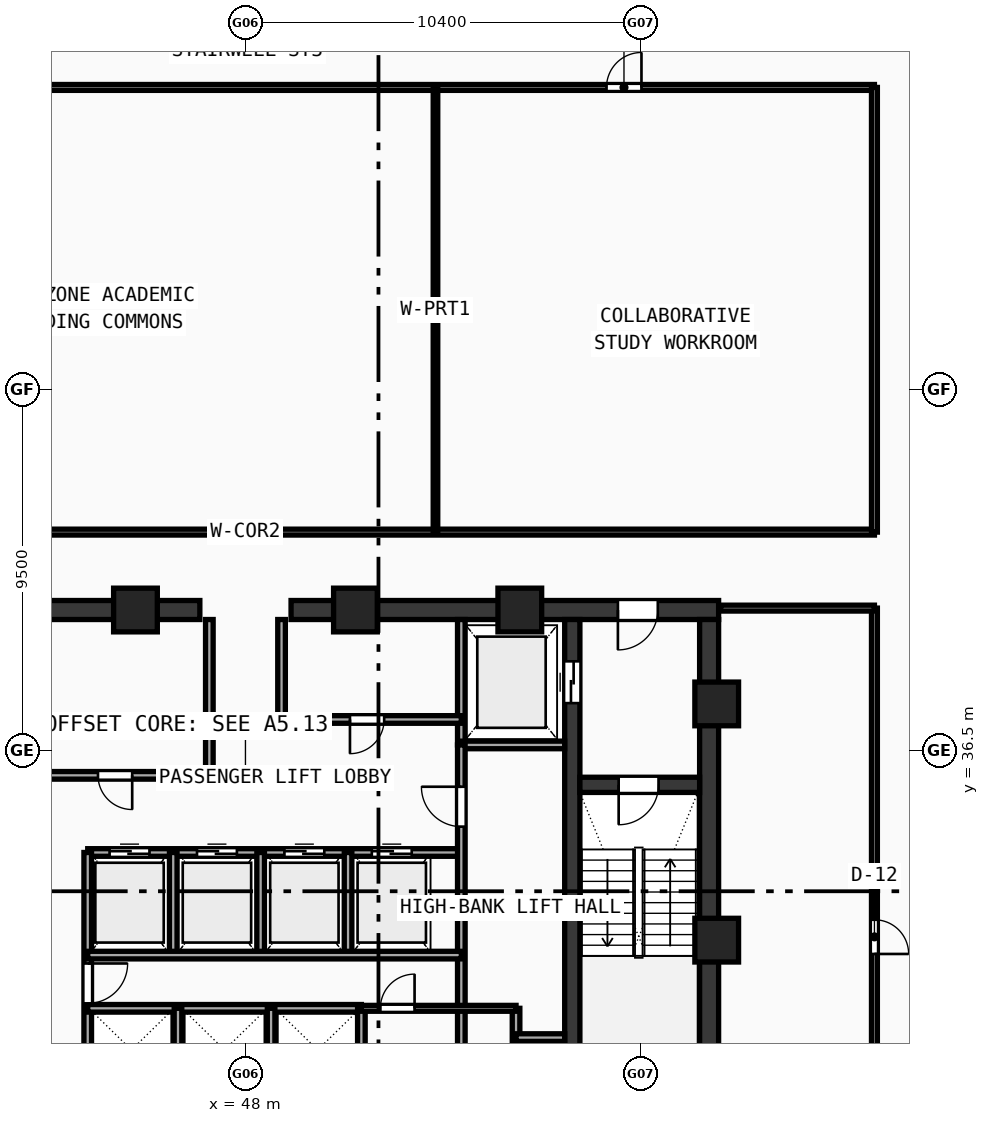
"""IFC4 building model, lengths in metres.
Left out: names, types, materials, properties, quantities, classifications, styles, units other than length and angle.
Written with IfcOpenShell. Run it as: python <this file> out.ifc"""

import sys

from ifc_helpers import new_model, si_unit, direction, frame, frame_2d, origin, origin_with_axes, origin_2d, place, context, subcontext, project, spatial, rectangle, hollow_rectangle, extrude, source, transform, mapped, element, fill, save


model = new_model("IFC4")
c1 = context("Model", 3, precision=1e-05, world=origin(), true_north=direction((0.0, 1.0)))
c2 = subcontext(c1, "Body", "Model", "MODEL_VIEW")
j1 = project(units=[si_unit("LENGTHUNIT", "METRE"), si_unit("PLANEANGLEUNIT", "RADIAN")], contexts=[c1])
p1 = place(None, origin())
s1 = spatial("IfcSite", under=j1, at=p1, CompositionType="ELEMENT")
p2 = place(p1, origin())
s2 = spatial("IfcBuilding", under=s1, at=p2, CompositionType="ELEMENT")
p3 = place(p2, frame((0.0, 0.0, 192.36)))
s3 = spatial("IfcBuildingStorey", under=s2, at=p3, CompositionType="ELEMENT", Elevation=192.36)
p4 = place(p3, frame((35.55, 40.2, 0.0), z_axis=(0.0, 0.0, 1.0), x_axis=(1.0, 0.0, 0.0)))
e1 = element("IfcWall", 1, at=p4, inside=s3, PredefinedType="SHEAR", context=c2, shape_type="SweptSolid", body=[
    extrude(rectangle(XDim=11.25, YDim=0.5, at=frame_2d((5.625, 0.0))), origin(), (0.0, 0.0, 1.0), 3.54),
])
p5 = place(p4, frame((1.6, 0.0, 0.0)))
e2 = element("IfcOpeningElement", 2, at=p5, cuts=e1, PredefinedType="OPENING", context=c2, shape_type="SweptSolid", body=[
    extrude(rectangle(XDim=1.05, YDim=2.1, at=frame_2d((0.525, 1.05))), frame((0.0, 0.26, 0.0), z_axis=(0.0, -1.0, 0.0), x_axis=(1.0, 0.0, 0.0)), (0.0, 0.0, 1.0), 0.52),
])
p6 = place(p3, frame((49.2, 40.2, 0.0), z_axis=(0.0, 0.0, 1.0), x_axis=(1.0, 0.0, 0.0)))
e3 = element("IfcWall", 3, at=p6, inside=s3, PredefinedType="SHEAR", context=c2, shape_type="SweptSolid", body=[
    extrude(rectangle(XDim=11.25, YDim=0.5, at=frame_2d((5.625, 0.0))), origin(), (0.0, 0.0, 1.0), 3.54),
])
p7 = place(p6, frame((8.6, 0.0, 0.0)))
e4 = element("IfcOpeningElement", 4, at=p7, cuts=e3, PredefinedType="OPENING", context=c2, shape_type="SweptSolid", body=[
    extrude(rectangle(XDim=1.05, YDim=2.1, at=frame_2d((0.525, 1.05))), frame((0.0, 0.26, 0.0), z_axis=(0.0, -1.0, 0.0), x_axis=(1.0, 0.0, 0.0)), (0.0, 0.0, 1.0), 0.52),
])
p8 = place(p3, frame((60.2, 27.75, 0.0), z_axis=(0.0, 0.0, 1.0), x_axis=(0.0, 1.0, 0.0)))
e5 = element("IfcWall", 5, at=p8, inside=s3, PredefinedType="SHEAR", context=c2, shape_type="SweptSolid", body=[
    extrude(rectangle(XDim=12.2, YDim=0.5, at=frame_2d((6.1, 0.0))), origin(), (0.0, 0.0, 1.0), 3.54),
])
p9 = place(p3, frame((56.6, 27.75, 0.0), z_axis=(0.0, 0.0, 1.0), x_axis=(0.0, 1.0, 0.0)))
e6 = element("IfcWall", 6, at=p9, inside=s3, PredefinedType="SHEAR", context=c2, shape_type="SweptSolid", body=[
    extrude(rectangle(XDim=12.2, YDim=0.4, at=frame_2d((6.1, 0.0))), origin(), (0.0, 0.0, 1.0), 3.54),
])
p10 = place(p9, frame((10.0, 0.0, 0.0)))
e7 = element("IfcOpeningElement", 7, at=p10, cuts=e6, PredefinedType="OPENING", context=c2, shape_type="SweptSolid", body=[
    extrude(rectangle(XDim=1.1, YDim=2.1, at=frame_2d((0.55, 1.05))), frame((0.0, 0.21, 0.0), z_axis=(0.0, -1.0, 0.0), x_axis=(1.0, 0.0, 0.0)), (0.0, 0.0, 1.0), 0.42),
])
p11 = place(p3, frame((56.8, 35.6, 0.0), z_axis=(0.0, 0.0, 1.0), x_axis=(1.0, 0.0, 0.0)))
e8 = element("IfcWall", 8, at=p11, inside=s3, PredefinedType="SHEAR", context=c2, shape_type="SweptSolid", body=[
    extrude(rectangle(XDim=3.15, YDim=0.4, at=frame_2d((1.575, 0.0))), origin(), (0.0, 0.0, 1.0), 3.54),
])
p12 = place(p11, frame((1.02, 0.0, 0.0)))
e9 = element("IfcOpeningElement", 9, at=p12, cuts=e8, PredefinedType="OPENING", context=c2, shape_type="SweptSolid", body=[
    extrude(rectangle(XDim=1.05, YDim=2.1, at=frame_2d((0.525, 1.05))), frame((0.0, 0.21, 0.0), z_axis=(0.0, -1.0, 0.0), x_axis=(1.0, 0.0, 0.0)), (0.0, 0.0, 1.0), 0.42),
])
m1 = source(origin(), c2, "Body", "SweptSolid", [
    extrude(hollow_rectangle(XDim=1.15, YDim=1.15, WallThickness=0.048, at=origin_2d()), origin(), (0.0, 0.0, 1.0), 3.8),
])
for number, where, z_axis, x_axis in (
    (10, (60.4, 31.513, -0.26), (0.0, 0.0, 1.0), (1.0, 0.0, 0.0)),
    (11, (60.4, 37.729, -0.26), (0.0, 0.0, 1.0), (1.0, 0.0, 0.0)),
    (12, (55.219, 40.2, -0.26), (0.0, 0.0, 1.0), (1.0, 0.0, 0.0)),
    (13, (50.894, 40.2, -0.26), (0.0, 0.0, 1.0), (1.0, 0.0, 0.0)),
    (14, (45.106, 40.2, -0.26), (0.0, 0.0, 1.0), (1.0, 0.0, 0.0)),
):
    element("IfcColumn", number, at=place(p3, frame(where, z_axis=z_axis, x_axis=x_axis)), inside=s3, PredefinedType="COLUMN", context=c2, shape_type="MappedRepresentation", body=[
        mapped(m1, transform((0.0, 0.0, 0.0), scale=1.0)),
    ])
p13 = place(p3, frame((53.68, 36.65, 0.0), z_axis=(0.0, 0.0, 1.0), x_axis=(0.0, 1.0, 0.0)))
e15 = element("IfcWall", 15, at=p13, inside=s3, PredefinedType="SOLIDWALL", context=c2, shape_type="SweptSolid", body=[
    extrude(rectangle(XDim=3.3, YDim=0.2, at=frame_2d((1.65, 0.0))), origin(), (0.0, 0.0, 1.0), 3.54),
])
p14 = place(p3, frame((53.68, 36.65, 0.0), z_axis=(0.0, 0.0, 1.0), x_axis=(1.0, 0.0, 0.0)))
e16 = element("IfcWall", 16, at=p14, inside=s3, PredefinedType="SOLIDWALL", context=c2, shape_type="SweptSolid", body=[
    extrude(rectangle(XDim=2.72, YDim=0.2, at=frame_2d((1.36, 0.0))), origin(), (0.0, 0.0, 1.0), 3.54),
])
p15 = place(p3, frame((42.32, 35.85, 0.0), z_axis=(0.0, 0.0, 1.0), x_axis=(1.0, 0.0, 0.0)))
e17 = element("IfcWall", 17, at=p15, inside=s3, PredefinedType="SOLIDWALL", context=c2, shape_type="SweptSolid", body=[
    extrude(rectangle(XDim=4.73, YDim=0.2, at=frame_2d((2.365, 0.0))), origin(), (0.0, 0.0, 1.0), 3.54),
])
p16 = place(p15, frame((1.8, 0.0, 0.0)))
e18 = element("IfcOpeningElement", 18, at=p16, cuts=e17, PredefinedType="OPENING", context=c2, shape_type="SweptSolid", body=[
    extrude(rectangle(XDim=0.9, YDim=2.1, at=frame_2d((0.45, 1.05))), frame((0.0, 0.11, 0.0), z_axis=(0.0, -1.0, 0.0), x_axis=(1.0, 0.0, 0.0)), (0.0, 0.0, 1.0), 0.22),
])
p17 = place(p3, frame((48.95, 37.32, 0.0), z_axis=(0.0, 0.0, 1.0), x_axis=(1.0, 0.0, 0.0)))
e19 = element("IfcWall", 19, at=p17, inside=s3, PredefinedType="SOLIDWALL", context=c2, shape_type="SweptSolid", body=[
    extrude(rectangle(XDim=4.73, YDim=0.2, at=frame_2d((2.365, 0.0))), origin(), (0.0, 0.0, 1.0), 3.54),
])
p18 = place(p17, frame((1.8, 0.0, 0.0)))
e20 = element("IfcOpeningElement", 20, at=p18, cuts=e19, PredefinedType="OPENING", context=c2, shape_type="SweptSolid", body=[
    extrude(rectangle(XDim=0.9, YDim=2.1, at=frame_2d((0.45, 1.05))), frame((0.0, 0.11, 0.0), z_axis=(0.0, -1.0, 0.0), x_axis=(1.0, 0.0, 0.0)), (0.0, 0.0, 1.0), 0.22),
])
p19 = place(p3, frame((47.05, 35.85, 0.0), z_axis=(0.0, 0.0, 1.0), x_axis=(0.0, 1.0, 0.0)))
e21 = element("IfcWall", 21, at=p19, inside=s3, PredefinedType="SOLIDWALL", context=c2, shape_type="SweptSolid", body=[
    extrude(rectangle(XDim=4.1, YDim=0.2, at=frame_2d((2.05, 0.0))), origin(), (0.0, 0.0, 1.0), 3.54),
])
p20 = place(p3, frame((48.95, 37.32, 0.0), z_axis=(0.0, 0.0, 1.0), x_axis=(0.0, 1.0, 0.0)))
e22 = element("IfcWall", 22, at=p20, inside=s3, PredefinedType="SOLIDWALL", context=c2, shape_type="SweptSolid", body=[
    extrude(rectangle(XDim=2.63, YDim=0.2, at=frame_2d((1.315, 0.0))), origin(), (0.0, 0.0, 1.0), 3.54),
])
p21 = place(p3, frame((43.85, 33.82, 0.0), z_axis=(0.0, 0.0, 1.0), x_axis=(1.0, 0.0, 0.0)))
e23 = element("IfcWall", 23, at=p21, inside=s3, PredefinedType="SOLIDWALL", context=c2, shape_type="SweptSolid", body=[
    extrude(rectangle(XDim=9.83, YDim=0.2, at=frame_2d((4.915, 0.0))), origin(), (0.0, 0.0, 1.0), 3.54),
])
p22 = place(p21, frame((0.575, 0.0, 0.0)))
e24 = element("IfcOpeningElement", 24, at=p22, cuts=e23, PredefinedType="OPENING", context=c2, shape_type="SweptSolid", body=[
    extrude(rectangle(XDim=1.05, YDim=2.1, at=frame_2d((0.525, 1.05))), frame((0.0, 0.11, 0.0), z_axis=(0.0, -1.0, 0.0), x_axis=(1.0, 0.0, 0.0)), (0.0, 0.0, 1.0), 0.22),
])
p23 = place(p21, frame((2.875, 0.0, 0.0)))
e25 = element("IfcOpeningElement", 25, at=p23, cuts=e23, PredefinedType="OPENING", context=c2, shape_type="SweptSolid", body=[
    extrude(rectangle(XDim=1.05, YDim=2.1, at=frame_2d((0.525, 1.05))), frame((0.0, 0.11, 0.0), z_axis=(0.0, -1.0, 0.0), x_axis=(1.0, 0.0, 0.0)), (0.0, 0.0, 1.0), 0.22),
])
p24 = place(p21, frame((5.175, 0.0, 0.0)))
e26 = element("IfcOpeningElement", 26, at=p24, cuts=e23, PredefinedType="OPENING", context=c2, shape_type="SweptSolid", body=[
    extrude(rectangle(XDim=1.05, YDim=2.1, at=frame_2d((0.525, 1.05))), frame((0.0, 0.11, 0.0), z_axis=(0.0, -1.0, 0.0), x_axis=(1.0, 0.0, 0.0)), (0.0, 0.0, 1.0), 0.22),
])
p25 = place(p21, frame((7.475, 0.0, 0.0)))
e27 = element("IfcOpeningElement", 27, at=p25, cuts=e23, PredefinedType="OPENING", context=c2, shape_type="SweptSolid", body=[
    extrude(rectangle(XDim=1.05, YDim=2.1, at=frame_2d((0.525, 1.05))), frame((0.0, 0.11, 0.0), z_axis=(0.0, -1.0, 0.0), x_axis=(1.0, 0.0, 0.0)), (0.0, 0.0, 1.0), 0.22),
])
p26 = place(p3, frame((43.85, 27.6, 0.0), z_axis=(0.0, 0.0, 1.0), x_axis=(0.0, 1.0, 0.0)))
e28 = element("IfcWall", 28, at=p26, inside=s3, PredefinedType="SOLIDWALL", context=c2, shape_type="SweptSolid", body=[
    extrude(rectangle(XDim=6.22, YDim=0.2, at=frame_2d((3.11, 0.0))), origin(), (0.0, 0.0, 1.0), 3.54),
])
p27 = place(p26, frame((2.25, 0.0, 0.0)))
e29 = element("IfcOpeningElement", 29, at=p27, cuts=e28, PredefinedType="OPENING", context=c2, shape_type="SweptSolid", body=[
    extrude(rectangle(XDim=1.05, YDim=2.1, at=frame_2d((0.525, 1.05))), frame((0.0, 0.11, 0.0), z_axis=(0.0, -1.0, 0.0), x_axis=(1.0, 0.0, 0.0)), (0.0, 0.0, 1.0), 0.22),
])
p28 = place(p3, frame((53.68, 27.6, 0.0), z_axis=(0.0, 0.0, 1.0), x_axis=(0.0, 1.0, 0.0)))
e30 = element("IfcWall", 30, at=p28, inside=s3, PredefinedType="SOLIDWALL", context=c2, shape_type="SweptSolid", body=[
    extrude(rectangle(XDim=9.05, YDim=0.2, at=frame_2d((4.525, 0.0))), origin(), (0.0, 0.0, 1.0), 3.54),
])
p29 = place(p28, frame((6.9, 0.0, 0.0)))
e31 = element("IfcOpeningElement", 31, at=p29, cuts=e30, PredefinedType="OPENING", context=c2, shape_type="SweptSolid", body=[
    extrude(rectangle(XDim=1.05, YDim=2.1, at=frame_2d((0.525, 1.05))), frame((0.0, 0.11, 0.0), z_axis=(0.0, -1.0, 0.0), x_axis=(1.0, 0.0, 0.0)), (0.0, 0.0, 1.0), 0.22),
])
for number, where, z_axis, x_axis in (
    (32, (46.1, 31.12, 0.0), (0.0, 0.0, 1.0), (0.0, 1.0, 0.0)),
    (33, (48.4, 31.12, 0.0), (0.0, 0.0, 1.0), (0.0, 1.0, 0.0)),
    (34, (50.7, 31.12, 0.0), (0.0, 0.0, 1.0), (0.0, 1.0, 0.0)),
):
    element("IfcWall", number, at=place(p3, frame(where, z_axis=z_axis, x_axis=x_axis)), inside=s3, PredefinedType="SOLIDWALL", context=c2, shape_type="SweptSolid", body=[
        extrude(rectangle(XDim=2.7, YDim=0.2, at=frame_2d((1.35, 0.0))), origin(), (0.0, 0.0, 1.0), 3.54),
    ])
p30 = place(p3, frame((43.85, 29.72, 0.0), z_axis=(0.0, 0.0, 1.0), x_axis=(1.0, 0.0, 0.0)))
e35 = element("IfcWall", 35, at=p30, inside=s3, PredefinedType="SOLIDWALL", context=c2, shape_type="SweptSolid", body=[
    extrude(rectangle(XDim=7.2, YDim=0.2, at=frame_2d((3.6, 0.0))), origin(), (0.0, 0.0, 1.0), 3.54),
])
p31 = place(p3, frame((51.05, 27.6, 0.0), z_axis=(0.0, 0.0, 1.0), x_axis=(0.0, 1.0, 0.0)))
e36 = element("IfcWall", 36, at=p31, inside=s3, PredefinedType="SOLIDWALL", context=c2, shape_type="SweptSolid", body=[
    extrude(rectangle(XDim=2.12, YDim=0.2, at=frame_2d((1.06, 0.0))), origin(), (0.0, 0.0, 1.0), 3.54),
])
p32 = place(p3, frame((43.85, 31.12, 0.0), z_axis=(0.0, 0.0, 1.0), x_axis=(1.0, 0.0, 0.0)))
e37 = element("IfcWall", 37, at=p32, inside=s3, PredefinedType="SOLIDWALL", context=c2, shape_type="SweptSolid", body=[
    extrude(rectangle(XDim=9.83, YDim=0.2, at=frame_2d((4.915, 0.0))), origin(), (0.0, 0.0, 1.0), 3.54),
])
for number, where, z_axis, x_axis in (
    (38, (46.225, 27.6, 0.0), (0.0, 0.0, 1.0), (0.0, 1.0, 0.0)),
    (39, (48.675, 27.6, 0.0), (0.0, 0.0, 1.0), (0.0, 1.0, 0.0)),
    (40, (55.12, 27.6, 0.0), (0.0, 0.0, 1.0), (0.0, 1.0, 0.0)),
):
    element("IfcWall", number, at=place(p3, frame(where, z_axis=z_axis, x_axis=x_axis)), inside=s3, PredefinedType="SOLIDWALL", context=c2, shape_type="SweptSolid", body=[
        extrude(rectangle(XDim=2.12, YDim=0.2, at=frame_2d((1.06, 0.0))), origin(), (0.0, 0.0, 1.0), 3.54),
    ])
p33 = place(p3, frame((55.12, 28.95, 0.0), z_axis=(0.0, 0.0, 1.0), x_axis=(1.0, 0.0, 0.0)))
e41 = element("IfcWall", 41, at=p33, inside=s3, PredefinedType="SOLIDWALL", context=c2, shape_type="SweptSolid", body=[
    extrude(rectangle(XDim=1.28, YDim=0.2, at=frame_2d((0.64, 0.0))), origin(), (0.0, 0.0, 1.0), 3.54),
])
p34 = place(p3, frame((51.05, 29.72, 0.0), z_axis=(0.0, 0.0, 1.0), x_axis=(1.0, 0.0, 0.0)))
e42 = element("IfcWall", 42, at=p34, inside=s3, PredefinedType="PARTITIONING", context=c2, shape_type="SweptSolid", body=[
    extrude(rectangle(XDim=4.07, YDim=0.155, at=frame_2d((2.035, 0.0))), origin(), (0.0, 0.0, 1.0), 3.54),
])
p35 = place(p34, frame((0.5, 0.0, 0.0)))
e43 = element("IfcOpeningElement", 43, at=p35, cuts=e42, PredefinedType="OPENING", context=c2, shape_type="SweptSolid", body=[
    extrude(rectangle(XDim=0.9, YDim=2.1, at=frame_2d((0.45, 1.05))), frame((0.0, 0.087, 0.0), z_axis=(0.0, -1.0, 0.0), x_axis=(1.0, 0.0, 0.0)), (0.0, 0.0, 1.0), 0.175),
])
p36 = place(p3, frame((31.45, 42.25, 0.0), z_axis=(0.0, 0.0, 1.0), x_axis=(1.0, 0.0, 0.0)))
e44 = element("IfcWall", 44, at=p36, inside=s3, PredefinedType="PARTITIONING", context=c2, shape_type="SweptSolid", body=[
    extrude(rectangle(XDim=33.1, YDim=0.155, at=frame_2d((16.55, 0.0))), origin(), (0.0, 0.0, 1.0), 2.89),
])
p37 = place(p3, frame((31.45, 53.95, 0.0), z_axis=(0.0, 0.0, 1.0), x_axis=(1.0, 0.0, 0.0)))
e45 = element("IfcWall", 45, at=p37, inside=s3, PredefinedType="PARTITIONING", context=c2, shape_type="SweptSolid", body=[
    extrude(rectangle(XDim=33.1, YDim=0.155, at=frame_2d((16.55, 0.0))), origin(), (0.0, 0.0, 1.0), 2.89),
])
p38 = place(p37, frame((8.0, 0.0, 0.0)))
e46 = element("IfcOpeningElement", 46, at=p38, cuts=e45, PredefinedType="OPENING", context=c2, shape_type="SweptSolid", body=[
    extrude(rectangle(XDim=0.92, YDim=2.1, at=frame_2d((0.46, 1.05))), frame((0.0, 0.087, 0.0), z_axis=(0.0, -1.0, 0.0), x_axis=(1.0, 0.0, 0.0)), (0.0, 0.0, 1.0), 0.175),
])
p39 = place(p37, frame((26.05, 0.0, 0.0)))
e47 = element("IfcOpeningElement", 47, at=p39, cuts=e45, PredefinedType="OPENING", context=c2, shape_type="SweptSolid", body=[
    extrude(rectangle(XDim=0.92, YDim=2.1, at=frame_2d((0.46, 1.05))), frame((0.0, 0.087, 0.0), z_axis=(0.0, -1.0, 0.0), x_axis=(1.0, 0.0, 0.0)), (0.0, 0.0, 1.0), 0.175),
])
p40 = place(p3, frame((64.55, 42.25, 0.0), z_axis=(0.0, 0.0, 1.0), x_axis=(0.0, 1.0, 0.0)))
e48 = element("IfcWall", 48, at=p40, inside=s3, PredefinedType="PARTITIONING", context=c2, shape_type="SweptSolid", body=[
    extrude(rectangle(XDim=11.7, YDim=0.155, at=frame_2d((5.85, 0.0))), origin(), (0.0, 0.0, 1.0), 2.89),
])
p41 = place(p3, frame((53.0, 42.25, 0.0), z_axis=(0.0, 0.0, 1.0), x_axis=(0.0, 1.0, 0.0)))
e49 = element("IfcWall", 49, at=p41, inside=s3, PredefinedType="PARTITIONING", context=c2, shape_type="SweptSolid", body=[
    extrude(rectangle(XDim=11.7, YDim=0.12, at=frame_2d((5.85, 0.0))), origin(), (0.0, 0.0, 1.0), 2.89),
])
p42 = place(p3, frame((64.55, 23.65, 0.0), z_axis=(0.0, 0.0, 1.0), x_axis=(0.0, 1.0, 0.0)))
e50 = element("IfcWall", 50, at=p42, inside=s3, PredefinedType="PARTITIONING", context=c2, shape_type="SweptSolid", body=[
    extrude(rectangle(XDim=16.6, YDim=0.155, at=frame_2d((8.3, 0.0))), origin(), (0.0, 0.0, 1.0), 2.89),
])
p43 = place(p42, frame((7.5, 0.0, 0.0)))
e51 = element("IfcOpeningElement", 51, at=p43, cuts=e50, PredefinedType="OPENING", context=c2, shape_type="SweptSolid", body=[
    extrude(rectangle(XDim=0.9, YDim=2.08, at=frame_2d((0.45, 1.04))), frame((0.0, 0.087, 0.0), z_axis=(0.0, -1.0, 0.0), x_axis=(1.0, 0.0, 0.0)), (0.0, 0.0, 1.0), 0.175),
])
p44 = place(p3, frame((60.5, 40.25, 0.0), z_axis=(0.0, 0.0, 1.0), x_axis=(1.0, 0.0, 0.0)))
e52 = element("IfcWall", 52, at=p44, inside=s3, PredefinedType="PARTITIONING", context=c2, shape_type="SweptSolid", body=[
    extrude(rectangle(XDim=4.05, YDim=0.155, at=frame_2d((2.025, 0.0))), origin(), (0.0, 0.0, 1.0), 3.54),
])
m2 = source(origin(), c2, "Body", "SweptSolid", [
    extrude(rectangle(XDim=1.05, YDim=2.1, at=frame_2d((0.525, 1.05))), frame((0.0, 0.025, 0.0), z_axis=(0.0, -1.0, 0.0), x_axis=(1.0, 0.0, 0.0)), (0.0, 0.0, 1.0), 0.05),
])
p45 = place(p12, frame((1.05, 0.0, 0.0), z_axis=(0.0, 0.0, 1.0), x_axis=(-1.0, 0.0, 0.0)))
e53 = element("IfcDoor", 53, at=p45, inside=s3, OperationType="SINGLE_SWING_RIGHT", PredefinedType="DOOR", context=c2, shape_type="MappedRepresentation", body=[
    mapped(m2, transform((0.0, 0.0, 0.0), scale=1.0)),
])
fill(e9, e53)
p46 = place(p7, frame((1.05, 0.0, 0.0), z_axis=(0.0, 0.0, 1.0), x_axis=(-1.0, 0.0, 0.0)))
e54 = element("IfcDoor", 54, at=p46, inside=s3, OperationType="SINGLE_SWING_RIGHT", PredefinedType="DOOR", context=c2, shape_type="MappedRepresentation", body=[
    mapped(m2, transform((0.0, 0.0, 0.0), scale=1.0)),
])
fill(e4, e54)
m3 = source(origin(), c2, "Body", "SweptSolid", [
    extrude(rectangle(XDim=1.1, YDim=2.1, at=frame_2d((0.55, 1.05))), frame((0.0, 0.025, 0.0), z_axis=(0.0, -1.0, 0.0), x_axis=(1.0, 0.0, 0.0)), (0.0, 0.0, 1.0), 0.05),
])
p47 = place(p10, origin_with_axes())
e55 = element("IfcDoor", 55, at=p47, inside=s3, OperationType="DOUBLE_DOOR_SLIDING", PredefinedType="DOOR", context=c2, shape_type="MappedRepresentation", body=[
    mapped(m3, transform((0.0, 0.0, 0.0), scale=1.0)),
])
fill(e7, e55)
m4 = source(origin(), c2, "Body", "SweptSolid", [
    extrude(rectangle(XDim=0.9, YDim=2.1, at=frame_2d((0.45, 1.05))), frame((0.0, 0.025, 0.0), z_axis=(0.0, -1.0, 0.0), x_axis=(1.0, 0.0, 0.0)), (0.0, 0.0, 1.0), 0.05),
])
p48 = place(p16, frame((0.9, 0.0, 0.0), z_axis=(0.0, 0.0, 1.0), x_axis=(-1.0, 0.0, 0.0)))
e56 = element("IfcDoor", 56, at=p48, inside=s3, OperationType="SINGLE_SWING_LEFT", PredefinedType="DOOR", context=c2, shape_type="MappedRepresentation", body=[
    mapped(m4, transform((0.0, 0.0, 0.0), scale=1.0)),
])
fill(e18, e56)
p49 = place(p18, frame((0.9, 0.0, 0.0), z_axis=(0.0, 0.0, 1.0), x_axis=(-1.0, 0.0, 0.0)))
e57 = element("IfcDoor", 57, at=p49, inside=s3, OperationType="SINGLE_SWING_RIGHT", PredefinedType="DOOR", context=c2, shape_type="MappedRepresentation", body=[
    mapped(m4, transform((0.0, 0.0, 0.0), scale=1.0)),
])
fill(e20, e57)
p50 = place(p22, origin_with_axes())
e58 = element("IfcDoor", 58, at=p50, inside=s3, OperationType="DOUBLE_DOOR_SLIDING", PredefinedType="DOOR", context=c2, shape_type="MappedRepresentation", body=[
    mapped(m2, transform((0.0, 0.0, 0.0), scale=1.0)),
])
fill(e24, e58)
p51 = place(p23, origin_with_axes())
e59 = element("IfcDoor", 59, at=p51, inside=s3, OperationType="DOUBLE_DOOR_SLIDING", PredefinedType="DOOR", context=c2, shape_type="MappedRepresentation", body=[
    mapped(m2, transform((0.0, 0.0, 0.0), scale=1.0)),
])
fill(e25, e59)
p52 = place(p24, origin_with_axes())
e60 = element("IfcDoor", 60, at=p52, inside=s3, OperationType="DOUBLE_DOOR_SLIDING", PredefinedType="DOOR", context=c2, shape_type="MappedRepresentation", body=[
    mapped(m2, transform((0.0, 0.0, 0.0), scale=1.0)),
])
fill(e26, e60)
p53 = place(p25, origin_with_axes())
e61 = element("IfcDoor", 61, at=p53, inside=s3, OperationType="DOUBLE_DOOR_SLIDING", PredefinedType="DOOR", context=c2, shape_type="MappedRepresentation", body=[
    mapped(m2, transform((0.0, 0.0, 0.0), scale=1.0)),
])
fill(e27, e61)
p54 = place(p27, frame((1.05, 0.0, 0.0), z_axis=(0.0, 0.0, 1.0), x_axis=(-1.0, 0.0, 0.0)))
e62 = element("IfcDoor", 62, at=p54, inside=s3, OperationType="SINGLE_SWING_LEFT", PredefinedType="DOOR", context=c2, shape_type="MappedRepresentation", body=[
    mapped(m2, transform((0.0, 0.0, 0.0), scale=1.0)),
])
fill(e29, e62)
p55 = place(p29, origin_with_axes())
e63 = element("IfcDoor", 63, at=p55, inside=s3, OperationType="SINGLE_SWING_RIGHT", PredefinedType="DOOR", context=c2, shape_type="MappedRepresentation", body=[
    mapped(m2, transform((0.0, 0.0, 0.0), scale=1.0)),
])
fill(e31, e63)
p56 = place(p35, origin_with_axes())
e64 = element("IfcDoor", 64, at=p56, inside=s3, OperationType="SINGLE_SWING_RIGHT", PredefinedType="DOOR", context=c2, shape_type="MappedRepresentation", body=[
    mapped(m4, transform((0.0, 0.0, 0.0), scale=1.0)),
])
fill(e43, e64)
m5 = source(origin(), c2, "Body", "SweptSolid", [
    extrude(rectangle(XDim=0.92, YDim=2.1, at=frame_2d((0.46, 1.05))), frame((0.0, 0.025, 0.0), z_axis=(0.0, -1.0, 0.0), x_axis=(1.0, 0.0, 0.0)), (0.0, 0.0, 1.0), 0.05),
])
p57 = place(p39, origin_with_axes())
e65 = element("IfcDoor", 65, at=p57, inside=s3, OperationType="SINGLE_SWING_RIGHT", PredefinedType="DOOR", context=c2, shape_type="MappedRepresentation", body=[
    mapped(m5, transform((0.0, 0.0, 0.0), scale=1.0)),
])
fill(e47, e65)
m6 = source(origin(), c2, "Body", "SweptSolid", [
    extrude(rectangle(XDim=0.9, YDim=2.08, at=frame_2d((0.45, 1.04))), frame((0.0, 0.025, 0.0), z_axis=(0.0, -1.0, 0.0), x_axis=(1.0, 0.0, 0.0)), (0.0, 0.0, 1.0), 0.05),
])
p58 = place(p43, frame((0.9, 0.0, 0.0), z_axis=(0.0, 0.0, 1.0), x_axis=(-1.0, 0.0, 0.0)))
e66 = element("IfcDoor", 66, at=p58, inside=s3, OperationType="SINGLE_SWING_RIGHT", PredefinedType="DOOR", context=c2, shape_type="MappedRepresentation", body=[
    mapped(m6, transform((0.0, 0.0, 0.0), scale=1.0)),
])
fill(e51, e66)
save(model, sys.argv[1])
